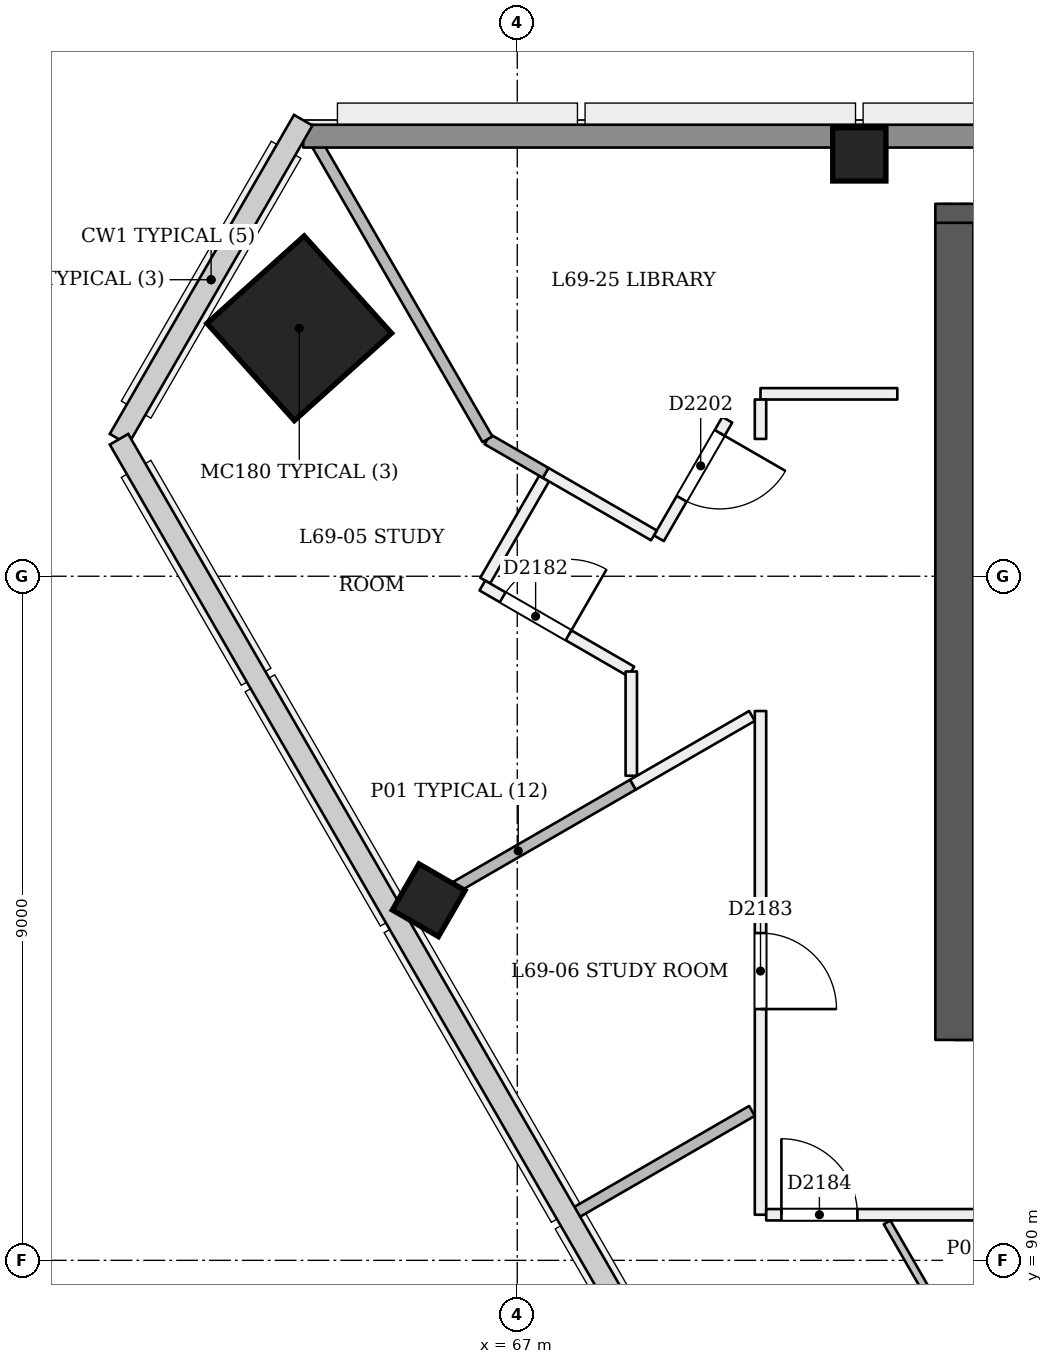
"""IFC4 building model, lengths in metres.
Left out: names, types, materials, properties, quantities, classifications, styles, units other than length and angle.
Written with IfcOpenShell. Run it as: python <this file> out.ifc"""

import sys

from ifc_helpers import new_model, si_unit, direction, frame, frame_2d, origin, origin_2d, place, context, subcontext, project, spatial, rectangle, extrude, element, fill, save


model = new_model("IFC4")
c1 = context("Model", 3, precision=1e-05, world=origin(), true_north=direction((0.0, 1.0)))
c2 = subcontext(c1, "Body", "Model", "MODEL_VIEW")
j1 = project(units=[si_unit("LENGTHUNIT", "METRE"), si_unit("PLANEANGLEUNIT", "RADIAN")], contexts=[c1])
p1 = place(None, origin())
s1 = spatial("IfcSite", under=j1, at=p1, CompositionType="ELEMENT")
p2 = place(p1, origin())
s2 = spatial("IfcBuilding", under=s1, at=p2, CompositionType="ELEMENT")
p3 = place(p2, frame((0.0, 0.0, 268.0)))
s3 = spatial("IfcBuildingStorey", under=s2, at=p3, CompositionType="ELEMENT", Elevation=268.0)
p4 = place(p3, frame((72.75, 93.15, 0.0), z_axis=(0.0, 0.0, 1.0), x_axis=(1.0, 0.0, 0.0)))
e1 = element("IfcWall", 1, at=p4, inside=s3, PredefinedType="SHEAR", context=c2, shape_type="SweptSolid", body=[
    extrude(rectangle(XDim=24.75, YDim=0.5, at=frame_2d((12.375, 0.0))), origin(), (0.0, 0.0, 1.0), 3.6),
])
p5 = place(p4, frame((1.05, 0.0, 0.0)))
e2 = element("IfcOpeningElement", 2, at=p5, cuts=e1, PredefinedType="OPENING", context=c2, shape_type="SweptSolid", body=[
    extrude(rectangle(XDim=1.2, YDim=2.1, at=frame_2d((0.6, 1.05))), frame((0.0, 0.26, 0.0), z_axis=(0.0, -1.0, 0.0), x_axis=(1.0, 0.0, 0.0)), (0.0, 0.0, 1.0), 0.521),
])
p6 = place(p4, frame((3.25, 0.0, 0.0)))
e3 = element("IfcOpeningElement", 3, at=p6, cuts=e1, PredefinedType="OPENING", context=c2, shape_type="SweptSolid", body=[
    extrude(rectangle(XDim=1.2, YDim=2.1, at=frame_2d((0.6, 1.05))), frame((0.0, 0.26, 0.0), z_axis=(0.0, -1.0, 0.0), x_axis=(1.0, 0.0, 0.0)), (0.0, 0.0, 1.0), 0.521),
])
p7 = place(p4, frame((13.25, 0.0, 0.0)))
e4 = element("IfcOpeningElement", 4, at=p7, cuts=e1, PredefinedType="OPENING", context=c2, shape_type="SweptSolid", body=[
    extrude(rectangle(XDim=1.2, YDim=2.1, at=frame_2d((0.6, 1.05))), frame((0.0, 0.26, 0.0), z_axis=(0.0, -1.0, 0.0), x_axis=(1.0, 0.0, 0.0)), (0.0, 0.0, 1.0), 0.521),
])
p8 = place(p4, frame((15.312, 0.0, 0.0)))
e5 = element("IfcOpeningElement", 5, at=p8, cuts=e1, PredefinedType="OPENING", context=c2, shape_type="SweptSolid", body=[
    extrude(rectangle(XDim=1.0, YDim=2.1, at=frame_2d((0.5, 1.05))), frame((0.0, 0.26, 0.0), z_axis=(0.0, -1.0, 0.0), x_axis=(1.0, 0.0, 0.0)), (0.0, 0.0, 1.0), 0.521),
])
p9 = place(p4, frame((17.55, 0.0, 0.0)))
e6 = element("IfcOpeningElement", 6, at=p9, cuts=e1, PredefinedType="OPENING", context=c2, shape_type="SweptSolid", body=[
    extrude(rectangle(XDim=1.0, YDim=2.1, at=frame_2d((0.5, 1.05))), frame((0.0, 0.26, 0.0), z_axis=(0.0, -1.0, 0.0), x_axis=(1.0, 0.0, 0.0)), (0.0, 0.0, 1.0), 0.521),
])
p10 = place(p4, frame((20.1, 0.0, 0.0)))
e7 = element("IfcOpeningElement", 7, at=p10, cuts=e1, PredefinedType="OPENING", context=c2, shape_type="SweptSolid", body=[
    extrude(rectangle(XDim=1.0, YDim=2.1, at=frame_2d((0.5, 1.05))), frame((0.0, 0.26, 0.0), z_axis=(0.0, -1.0, 0.0), x_axis=(1.0, 0.0, 0.0)), (0.0, 0.0, 1.0), 0.521),
])
p11 = place(p4, frame((22.587, 0.0, 0.0)))
e8 = element("IfcOpeningElement", 8, at=p11, cuts=e1, PredefinedType="OPENING", context=c2, shape_type="SweptSolid", body=[
    extrude(rectangle(XDim=1.0, YDim=2.1, at=frame_2d((0.5, 1.05))), frame((0.0, 0.26, 0.0), z_axis=(0.0, -1.0, 0.0), x_axis=(1.0, 0.0, 0.0)), (0.0, 0.0, 1.0), 0.521),
])
p12 = place(p3, frame((97.25, 103.65, 0.0), z_axis=(0.0, 0.0, 1.0), x_axis=(-1.0, 0.0, 0.0)))
e9 = element("IfcWall", 9, at=p12, inside=s3, PredefinedType="SHEAR", context=c2, shape_type="SweptSolid", body=[
    extrude(rectangle(XDim=24.75, YDim=0.5, at=frame_2d((12.375, 0.0))), origin(), (0.0, 0.0, 1.0), 3.6),
])
p13 = place(p3, frame((72.75, 103.65, 0.0), z_axis=(0.0, 0.0, 1.0), x_axis=(0.0, -1.0, 0.0)))
e10 = element("IfcWall", 10, at=p13, inside=s3, PredefinedType="SHEAR", context=c2, shape_type="SweptSolid", body=[
    extrude(rectangle(XDim=10.75, YDim=0.5, at=frame_2d((5.375, 0.0))), origin(), (0.0, 0.0, 1.0), 3.6),
])
p14 = place(p3, frame((64.098, 102.251, 0.0), z_axis=(0.028401796786, 0.009286506348, 0.999553449666), x_axis=(-0.866207749735, 0.49928465528, 0.019974165832)))
e11 = element("IfcColumn", 11, at=p14, inside=s3, PredefinedType="COLUMN", context=c2, shape_type="SweptSolid", body=[
    extrude(rectangle(XDim=1.72, YDim=1.72, at=origin_2d()), origin(), (0.0, 0.0, 1.0), 3.602),
])
p15 = place(p3, frame((71.5, 104.55, 0.0), z_axis=(0.0, 0.0, 1.0), x_axis=(1.0, 0.0, 0.0)))
e12 = element("IfcColumn", 12, at=p15, inside=s3, PredefinedType="COLUMN", context=c2, shape_type="SweptSolid", body=[
    extrude(rectangle(XDim=0.7, YDim=0.7, at=origin_2d()), origin(), (0.0, 0.0, 1.0), 3.6),
])
p16 = place(p3, frame((65.808, 94.69, -0.021), z_axis=(0.02215369191, 0.038413282303, 0.999016333038), x_axis=(-0.865364679312, -0.499669092789, 0.038402727909)))
e13 = element("IfcColumn", 13, at=p16, inside=s3, PredefinedType="COLUMN", context=c2, shape_type="SweptSolid", body=[
    extrude(rectangle(XDim=0.7, YDim=0.7, at=origin_2d()), origin(), (0.0, 0.0, 1.0), 3.604),
])
p17 = place(p3, frame((67.353, 100.285, 0.0), z_axis=(0.0, 0.0, 1.0), x_axis=(-0.500017819788, -0.86601511528, 0.0)))
e14 = element("IfcWall", 14, at=p17, inside=s3, PredefinedType="PARTITIONING", context=c2, shape_type="SweptSolid", body=[
    extrude(rectangle(XDim=1.55, YDim=0.15, at=frame_2d((0.775, 0.0))), origin(), (0.0, 0.0, 1.0), 3.2),
])
p18 = place(p3, frame((66.541, 98.878, 0.0), z_axis=(0.0, 0.0, 1.0), x_axis=(0.866036427558, -0.499980905779, 0.0)))
e15 = element("IfcWall", 15, at=p18, inside=s3, PredefinedType="PARTITIONING", context=c2, shape_type="SweptSolid", body=[
    extrude(rectangle(XDim=2.262, YDim=0.15, at=frame_2d((1.131, 0.0))), origin(), (0.0, 0.0, 1.0), 3.2),
])
p19 = place(p18, frame((0.309, 0.0, 0.0)))
e16 = element("IfcOpeningElement", 16, at=p19, cuts=e15, PredefinedType="OPENING", context=c2, shape_type="SweptSolid", body=[
    extrude(rectangle(XDim=1.0, YDim=2.1, at=frame_2d((0.5, 1.05))), frame((0.0, 0.085, 0.0), z_axis=(0.0, -1.0, 0.0), x_axis=(1.0, 0.0, 0.0)), (0.0, 0.0, 1.0), 0.171),
])
p20 = place(p3, frame((68.5, 97.747, 0.0), z_axis=(0.0, 0.0, 1.0), x_axis=(0.0, -1.0, 0.0)))
e17 = element("IfcWall", 17, at=p20, inside=s3, PredefinedType="PARTITIONING", context=c2, shape_type="SweptSolid", body=[
    extrude(rectangle(XDim=1.371, YDim=0.15, at=frame_2d((0.686, 0.0))), origin(), (0.0, 0.0, 1.0), 3.2),
])
p21 = place(p3, frame((68.52, 96.257, 0.0), z_axis=(0.0, 0.0, 1.0), x_axis=(0.866059791431, 0.499940434119, 0.0)))
e18 = element("IfcWall", 18, at=p21, inside=s3, PredefinedType="PARTITIONING", context=c2, shape_type="SweptSolid", body=[
    extrude(rectangle(XDim=1.81, YDim=0.15, at=frame_2d((0.905, 0.0))), origin(), (0.0, 0.0, 1.0), 3.2),
])
p22 = place(p3, frame((70.2, 97.227, 0.0), z_axis=(0.0, 0.0, 1.0), x_axis=(0.0, -1.0, 0.0)))
e19 = element("IfcWall", 19, at=p22, inside=s3, PredefinedType="PARTITIONING", context=c2, shape_type="SweptSolid", body=[
    extrude(rectangle(XDim=6.627, YDim=0.15, at=frame_2d((3.313, 0.0))), origin(), (0.0, 0.0, 1.0), 3.2),
])
p23 = place(p22, frame((2.921, 0.0, 0.0)))
e20 = element("IfcOpeningElement", 20, at=p23, cuts=e19, PredefinedType="OPENING", context=c2, shape_type="SweptSolid", body=[
    extrude(rectangle(XDim=1.0, YDim=2.1, at=frame_2d((0.5, 1.05))), frame((0.0, 0.085, 0.0), z_axis=(0.0, -1.0, 0.0), x_axis=(1.0, 0.0, 0.0)), (0.0, 0.0, 1.0), 0.171),
])
p24 = place(p3, frame((70.275, 90.6, 0.0), z_axis=(0.0, 0.0, 1.0), x_axis=(1.0, 0.0, 0.0)))
e21 = element("IfcWall", 21, at=p24, inside=s3, PredefinedType="PARTITIONING", context=c2, shape_type="SweptSolid", body=[
    extrude(rectangle(XDim=4.881, YDim=0.15, at=frame_2d((2.44, 0.0))), origin(), (0.0, 0.0, 1.0), 3.2),
])
p25 = place(p24, frame((0.2, 0.0, 0.0)))
e22 = element("IfcOpeningElement", 22, at=p25, cuts=e21, PredefinedType="OPENING", context=c2, shape_type="SweptSolid", body=[
    extrude(rectangle(XDim=1.0, YDim=2.1, at=frame_2d((0.5, 1.05))), frame((0.0, 0.085, 0.0), z_axis=(0.0, -1.0, 0.0), x_axis=(1.0, 0.0, 0.0)), (0.0, 0.0, 1.0), 0.171),
])
p26 = place(p3, frame((72.0, 101.4, 0.0), z_axis=(0.0, 0.0, 1.0), x_axis=(-1.0, 0.0, 0.0)))
e23 = element("IfcWall", 23, at=p26, inside=s3, PredefinedType="PARTITIONING", context=c2, shape_type="SweptSolid", body=[
    extrude(rectangle(XDim=1.8, YDim=0.15, at=frame_2d((0.9, 0.0))), origin(), (0.0, 0.0, 1.0), 3.2),
])
p27 = place(p3, frame((70.2, 101.325, 0.0), z_axis=(0.0, 0.0, 1.0), x_axis=(0.0, -1.0, 0.0)))
e24 = element("IfcWall", 24, at=p27, inside=s3, PredefinedType="PARTITIONING", context=c2, shape_type="SweptSolid", body=[
    extrude(rectangle(XDim=0.519, YDim=0.15, at=frame_2d((0.259, 0.0))), origin(), (0.0, 0.0, 1.0), 3.2),
])
p28 = place(p3, frame((69.763, 101.059, 0.0), z_axis=(0.0, 0.0, 1.0), x_axis=(-0.499961193289, -0.866047807691, 0.0)))
e25 = element("IfcWall", 25, at=p28, inside=s3, PredefinedType="PARTITIONING", context=c2, shape_type="SweptSolid", body=[
    extrude(rectangle(XDim=1.8, YDim=0.15, at=frame_2d((0.9, 0.0))), origin(), (0.0, 0.0, 1.0), 3.2),
])
p29 = place(p28, frame((0.2, 0.0, 0.0)))
e26 = element("IfcOpeningElement", 26, at=p29, cuts=e25, PredefinedType="OPENING", context=c2, shape_type="SweptSolid", body=[
    extrude(rectangle(XDim=1.0, YDim=2.1, at=frame_2d((0.5, 1.05))), frame((0.0, 0.085, 0.0), z_axis=(0.0, -1.0, 0.0), x_axis=(1.0, 0.0, 0.0)), (0.0, 0.0, 1.0), 0.171),
])
p30 = place(p3, frame((68.798, 99.538, 0.0), z_axis=(0.0, 0.0, 1.0), x_axis=(-0.866052144996, 0.499953680002, 0.0)))
e27 = element("IfcWall", 27, at=p30, inside=s3, PredefinedType="PARTITIONING", context=c2, shape_type="SweptSolid", body=[
    extrude(rectangle(XDim=1.645, YDim=0.15, at=frame_2d((0.823, 0.0))), origin(), (0.0, 0.0, 1.0), 3.2),
])
p31 = place(p3, frame((65.505, 94.516, 0.0), z_axis=(0.0, 0.0, 1.0), x_axis=(0.866033778982, 0.499985493453, 0.0)))
e28 = element("IfcWall", 28, at=p31, inside=s3, PredefinedType="PARTITIONING", context=c2, shape_type="SweptSolid", body=[
    extrude(rectangle(XDim=3.481, YDim=0.15, at=frame_2d((1.741, 0.0))), origin(), (0.0, 0.0, 1.0), 2.7),
])
p32 = place(p3, frame((67.373, 100.36, 0.0), z_axis=(0.0, 0.0, 1.0), x_axis=(-0.865974036371, 0.500088960417, 0.0)))
e29 = element("IfcWall", 29, at=p32, inside=s3, PredefinedType="PARTITIONING", context=c2, shape_type="SweptSolid", body=[
    extrude(rectangle(XDim=0.884, YDim=0.15, at=frame_2d((0.442, 0.0))), origin(), (0.0, 0.0, 1.0), 3.2),
])
p33 = place(p3, frame((66.608, 100.802, 0.0), z_axis=(0.0, 0.0, 1.0), x_axis=(-0.500029142445, 0.866008577732, 0.0)))
e30 = element("IfcWall", 30, at=p33, inside=s3, PredefinedType="PARTITIONING", context=c2, shape_type="SweptSolid", body=[
    extrude(rectangle(XDim=4.732, YDim=0.15, at=frame_2d((2.366, 0.0))), origin(), (0.0, 0.0, 1.0), 2.7),
])
p34 = place(p3, frame((67.738, 90.609, 0.0), z_axis=(0.0, 0.0, 1.0), x_axis=(0.866025261224, 0.500000246922, 0.0)))
e31 = element("IfcWall", 31, at=p34, inside=s3, PredefinedType="PARTITIONING", context=c2, shape_type="SweptSolid", body=[
    extrude(rectangle(XDim=2.713, YDim=0.15, at=frame_2d((1.357, 0.0))), origin(), (0.0, 0.0, 1.0), 2.7),
])
p35 = place(p3, frame((74.286, 86.307, 0.0), z_axis=(0.0, 0.0, 1.0), x_axis=(-0.50000034515, 0.866025204512, 0.0)))
e32 = element("IfcWall", 32, at=p35, inside=s3, PredefinedType="PARTITIONING", context=c2, shape_type="SweptSolid", body=[
    extrude(rectangle(XDim=4.842, YDim=0.1, at=frame_2d((2.421, 0.0))), origin(), (0.0, 0.0, 1.0), 2.8),
])
p36 = place(p35, frame((2.932, 0.0, 0.0)))
e33 = element("IfcOpeningElement", 33, at=p36, cuts=e32, PredefinedType="OPENING", context=c2, shape_type="SweptSolid", body=[
    extrude(rectangle(XDim=0.9, YDim=2.1, at=frame_2d((0.45, 1.05))), frame((0.0, 0.061, 0.0), z_axis=(0.0, -1.0, 0.0), x_axis=(1.0, 0.0, 0.0)), (0.0, 0.0, 1.0), 0.121),
])
p37 = place(p35, frame((0.8, 0.0, 0.0)))
e34 = element("IfcOpeningElement", 34, at=p37, cuts=e32, PredefinedType="OPENING", context=c2, shape_type="SweptSolid", body=[
    extrude(rectangle(XDim=0.9, YDim=2.1, at=frame_2d((0.45, 1.05))), frame((0.0, 0.061, 0.0), z_axis=(0.0, -1.0, 0.0), x_axis=(1.0, 0.0, 0.0)), (0.0, 0.0, 1.0), 0.121),
])
p38 = place(p3, frame((64.184, 104.79, 0.0), z_axis=(0.0, 0.0, 1.0), x_axis=(1.0, 0.0, 0.0)))
e35 = element("IfcWall", 35, at=p38, inside=s3, PredefinedType="SOLIDWALL", context=c2, shape_type="SweptSolid", body=[
    extrude(rectangle(XDim=41.632, YDim=0.3, at=frame_2d((20.816, 0.0))), origin(), (0.0, 0.0, 1.0), 2.7),
])
p39 = place(p19, origin())
e36 = element("IfcDoor", 36, at=p39, inside=s3, OperationType="SINGLE_SWING_RIGHT", PredefinedType="NOTDEFINED", context=c2, shape_type="SweptSolid", body=[
    extrude(rectangle(XDim=1.0, YDim=2.1, at=frame_2d((0.5, 1.05))), frame((0.0, 0.025, 0.0), z_axis=(0.0, -1.0, 0.0), x_axis=(1.0, 0.0, 0.0)), (0.0, 0.0, 1.0), 0.05),
])
fill(e16, e36)
p40 = place(p23, origin())
e37 = element("IfcDoor", 37, at=p40, inside=s3, OperationType="SINGLE_SWING_RIGHT", PredefinedType="NOTDEFINED", context=c2, shape_type="SweptSolid", body=[
    extrude(rectangle(XDim=1.0, YDim=2.1, at=frame_2d((0.5, 1.05))), frame((0.0, 0.025, 0.0), z_axis=(0.0, -1.0, 0.0), x_axis=(1.0, 0.0, 0.0)), (0.0, 0.0, 1.0), 0.05),
])
fill(e20, e37)
p41 = place(p25, origin())
e38 = element("IfcDoor", 38, at=p41, inside=s3, OperationType="SINGLE_SWING_LEFT", PredefinedType="NOTDEFINED", context=c2, shape_type="SweptSolid", body=[
    extrude(rectangle(XDim=1.0, YDim=2.1, at=frame_2d((0.5, 1.05))), frame((0.0, 0.025, 0.0), z_axis=(0.0, -1.0, 0.0), x_axis=(1.0, 0.0, 0.0)), (0.0, 0.0, 1.0), 0.05),
])
fill(e22, e38)
p42 = place(p29, origin())
e39 = element("IfcDoor", 39, at=p42, inside=s3, OperationType="SINGLE_SWING_LEFT", PredefinedType="NOTDEFINED", context=c2, shape_type="SweptSolid", body=[
    extrude(rectangle(XDim=1.0, YDim=2.1, at=frame_2d((0.5, 1.05))), frame((0.0, 0.025, 0.0), z_axis=(0.0, -1.0, 0.0), x_axis=(1.0, 0.0, 0.0)), (0.0, 0.0, 1.0), 0.05),
])
fill(e26, e39)
save(model, sys.argv[1])
